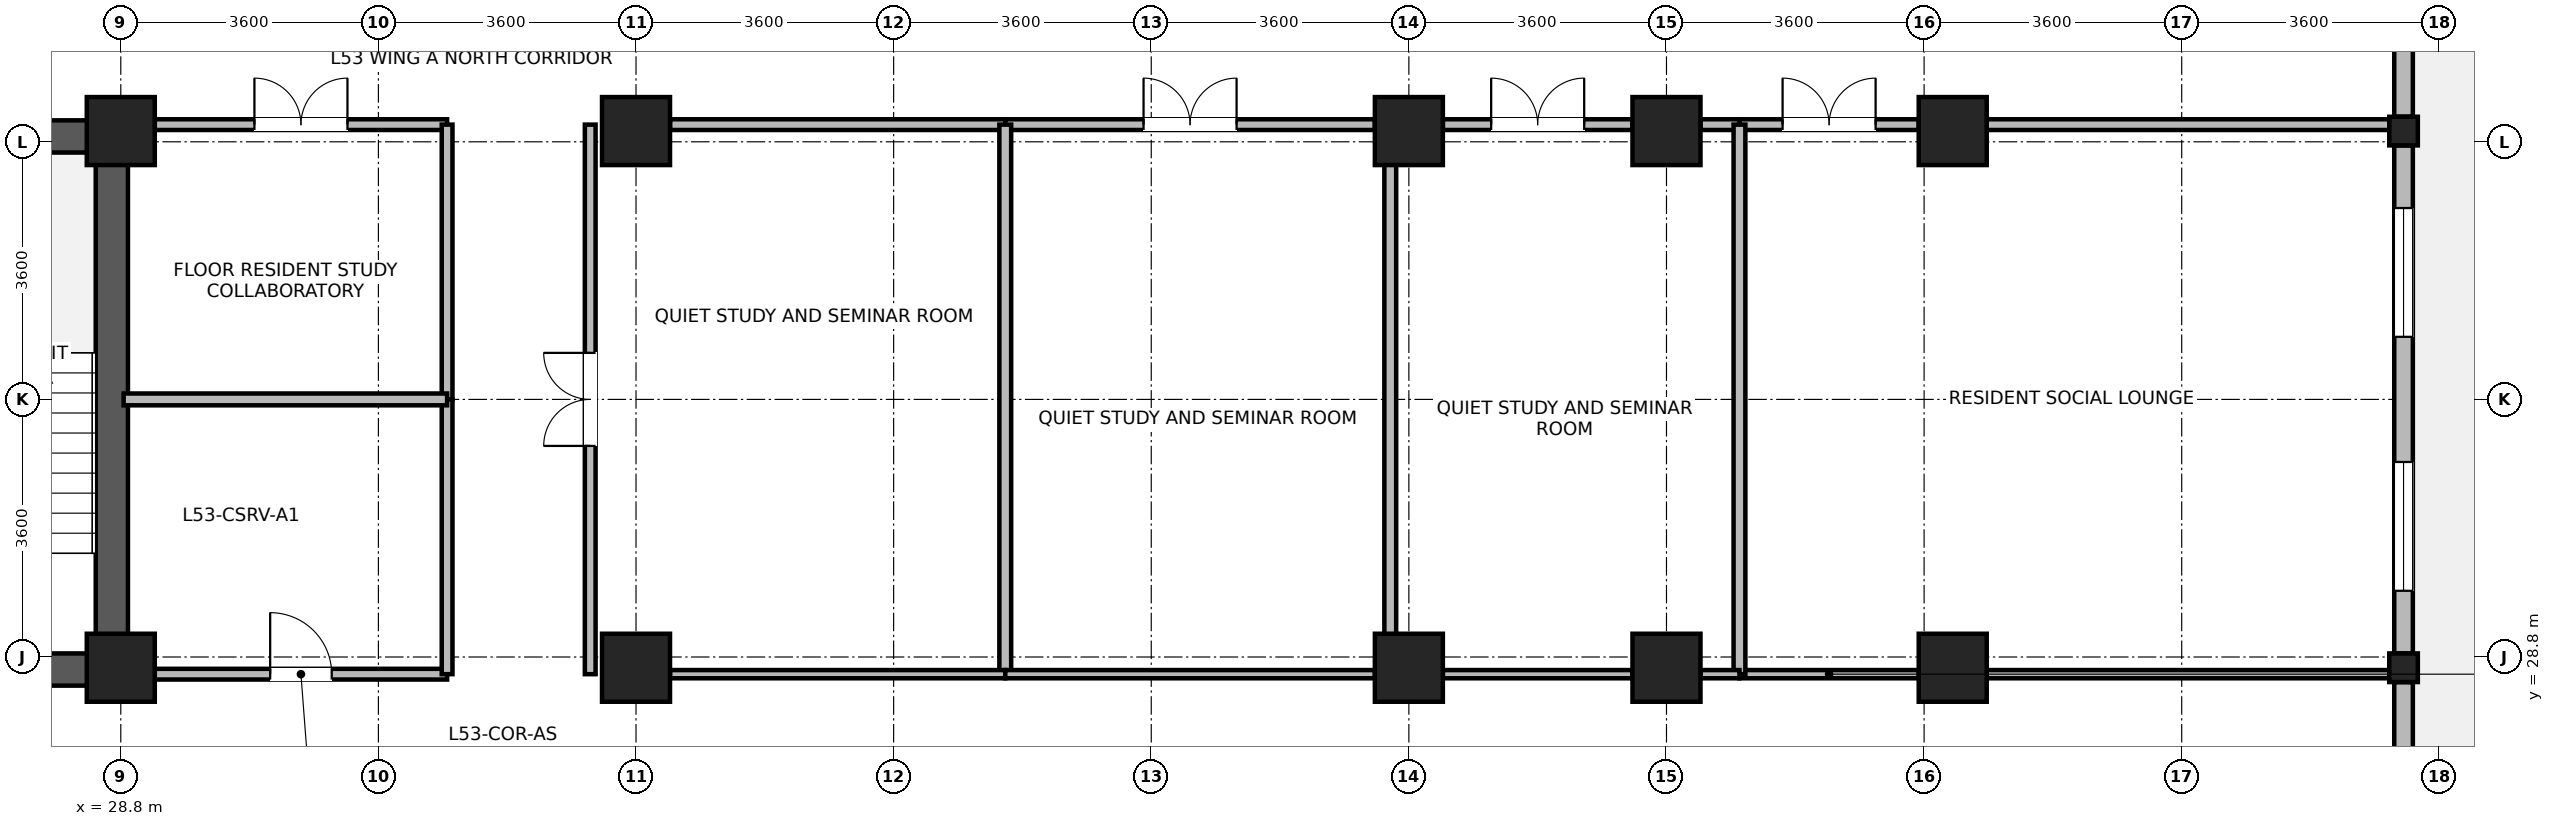
"""IFC4 building model, lengths in metres.
Left out: names, types, materials, properties, quantities, classifications, styles, units other than length and angle.
Written with IfcOpenShell. Run it as: python <this file> out.ifc"""

import sys

from ifc_helpers import new_model, si_unit, direction, frame, frame_2d, origin, origin_2d, place, context, subcontext, project, spatial, rectangle, i_section, extrude, source, transform, mapped, element, fill, save


model = new_model("IFC4")
c1 = context("Model", 3, precision=1e-05, world=origin(), true_north=direction((0.0, 1.0)))
c2 = subcontext(c1, "Body", "Model", "MODEL_VIEW")
j1 = project(units=[si_unit("LENGTHUNIT", "METRE"), si_unit("PLANEANGLEUNIT", "RADIAN")], contexts=[c1])
p1 = place(None, origin())
s1 = spatial("IfcSite", under=j1, at=p1, CompositionType="ELEMENT")
p2 = place(p1, origin())
s2 = spatial("IfcBuilding", under=s1, at=p2, CompositionType="ELEMENT")
p3 = place(p2, frame((0.0, 0.0, 209.2)))
s3 = spatial("IfcBuildingStorey", under=s2, at=p3, CompositionType="ELEMENT", Elevation=209.2)
p4 = place(p3, frame((28.675, 28.4, 0.0), z_axis=(0.0, 0.0, 1.0), x_axis=(0.0, 1.0, 0.0)))
e1 = element("IfcWall", 1, at=p4, inside=s3, PredefinedType="SHEAR", context=c2, shape_type="SweptSolid", body=[
    extrude(rectangle(XDim=7.9, YDim=0.45, at=frame_2d((3.95, 0.0))), origin(), (0.0, 0.0, 1.0), 3.47),
])
for number, where, z_axis, x_axis in (
    (2, (25.25, 28.625, 0.0), (0.0, 0.0, 1.0), (1.0, 0.0, 0.0)),
    (3, (25.25, 36.075, 0.0), (0.0, 0.0, 1.0), (1.0, 0.0, 0.0)),
):
    element("IfcWall", number, at=place(p3, frame(where, z_axis=z_axis, x_axis=x_axis)), inside=s3, PredefinedType="SHEAR", context=c2, shape_type="SweptSolid", body=[
        extrude(rectangle(XDim=3.2, YDim=0.45, at=frame_2d((1.6, 0.0))), origin(), (0.0, 0.0, 1.0), 3.47),
    ])
m1 = source(origin(), c2, "Body", "SweptSolid", [
    extrude(rectangle(XDim=0.95, YDim=0.95, at=origin_2d()), origin(), (0.0, 0.0, 1.0), 3.7),
])
for number, where, z_axis, x_axis in (
    (4, (28.8, 28.65, 0.0), (0.0, 0.0, 1.0), (1.0, 0.0, 0.0)),
    (5, (28.8, 36.15, 0.0), (0.0, 0.0, 1.0), (1.0, 0.0, 0.0)),
    (6, (36.0, 28.65, 0.0), (0.0, 0.0, 1.0), (1.0, 0.0, 0.0)),
    (7, (36.0, 36.15, 0.0), (0.0, 0.0, 1.0), (1.0, 0.0, 0.0)),
    (8, (46.8, 28.65, 0.0), (0.0, 0.0, 1.0), (1.0, 0.0, 0.0)),
    (9, (46.8, 36.15, 0.0), (0.0, 0.0, 1.0), (1.0, 0.0, 0.0)),
    (10, (50.4, 28.65, 0.0), (0.0, 0.0, 1.0), (1.0, 0.0, 0.0)),
    (11, (50.4, 36.15, 0.0), (0.0, 0.0, 1.0), (1.0, 0.0, 0.0)),
    (12, (54.4, 28.65, 0.0), (0.0, 0.0, 1.0), (1.0, 0.0, 0.0)),
    (13, (54.4, 36.15, 0.0), (0.0, 0.0, 1.0), (1.0, 0.0, 0.0)),
):
    element("IfcColumn", number, at=place(p3, frame(where, z_axis=z_axis, x_axis=x_axis)), inside=s3, PredefinedType="COLUMN", context=c2, shape_type="MappedRepresentation", body=[
        mapped(m1, transform((0.0, 0.0, 0.0), x_axis=(1.0, 0.0, 0.0), y_axis=(0.0, 1.0, 0.0), z_axis=(0.0, 0.0, 1.0), scale=1.0)),
    ])
m2 = source(origin(), c2, "Body", "SweptSolid", [
    extrude(i_section(OverallWidth=0.399, OverallDepth=0.4, WebThickness=0.017, FlangeThickness=0.023, FilletRadius=0.015, at=origin_2d()), origin(), (0.0, 0.0, 1.0), 3.7),
])
for number, where, z_axis, x_axis in (
    (14, (60.7, 28.65, 0.0), (0.0, 0.0, 1.0), (1.0, 0.0, 0.0)),
    (15, (60.7, 36.15, 0.0), (0.0, 0.0, 1.0), (1.0, 0.0, 0.0)),
):
    element("IfcColumn", number, at=place(p3, frame(where, z_axis=z_axis, x_axis=x_axis)), inside=s3, PredefinedType="COLUMN", context=c2, shape_type="MappedRepresentation", body=[
        mapped(m2, transform((0.0, 0.0, 0.0), x_axis=(1.0, 0.0, 0.0), y_axis=(0.0, 1.0, 0.0), z_axis=(0.0, 0.0, 1.0), scale=1.0)),
    ])
p5 = place(p3, frame((60.7, 28.449, 0.0), z_axis=(0.0, 0.0, 1.0), x_axis=(0.0, -1.0, 0.0)))
e16 = element("IfcWall", 16, at=p5, inside=s3, PredefinedType="STANDARD", context=c2, shape_type="SweptSolid", body=[
    extrude(rectangle(XDim=6.648, YDim=0.26, at=frame_2d((3.324, 0.0))), origin(), (0.0, 0.0, 1.0), 3.0),
])
p6 = place(p5, frame((4.086, 0.0, 0.85)))
e17 = element("IfcOpeningElement", 17, at=p6, cuts=e16, PredefinedType="OPENING", context=c2, shape_type="SweptSolid", body=[
    extrude(rectangle(XDim=1.8, YDim=1.85, at=frame_2d((0.9, 0.925))), frame((0.0, 0.14, 0.0), z_axis=(0.0, -1.0, 0.0), x_axis=(1.0, 0.0, 0.0)), (0.0, 0.0, 1.0), 0.28),
])
p7 = place(p5, frame((2.317, 0.0, 0.85)))
e18 = element("IfcOpeningElement", 18, at=p7, cuts=e16, PredefinedType="OPENING", context=c2, shape_type="SweptSolid", body=[
    extrude(rectangle(XDim=0.95, YDim=1.75, at=frame_2d((0.475, 0.875))), frame((0.0, 0.14, 0.0), z_axis=(0.0, -1.0, 0.0), x_axis=(1.0, 0.0, 0.0)), (0.0, 0.0, 1.0), 0.28),
])
p8 = place(p3, frame((60.7, 35.949, 0.0), z_axis=(0.0, 0.0, 1.0), x_axis=(0.0, -1.0, 0.0)))
e19 = element("IfcWall", 19, at=p8, inside=s3, PredefinedType="STANDARD", context=c2, shape_type="SweptSolid", body=[
    extrude(rectangle(XDim=7.098, YDim=0.26, at=frame_2d((3.549, 0.0))), origin(), (0.0, 0.0, 1.0), 3.0),
])
p9 = place(p8, frame((0.875, 0.0, 0.85)))
e20 = element("IfcOpeningElement", 20, at=p9, cuts=e19, PredefinedType="OPENING", context=c2, shape_type="SweptSolid", body=[
    extrude(rectangle(XDim=1.8, YDim=1.85, at=frame_2d((0.9, 0.925))), frame((0.0, 0.14, 0.0), z_axis=(0.0, -1.0, 0.0), x_axis=(1.0, 0.0, 0.0)), (0.0, 0.0, 1.0), 0.28),
])
p10 = place(p8, frame((4.424, 0.0, 0.85)))
e21 = element("IfcOpeningElement", 21, at=p10, cuts=e19, PredefinedType="OPENING", context=c2, shape_type="SweptSolid", body=[
    extrude(rectangle(XDim=1.8, YDim=1.85, at=frame_2d((0.9, 0.925))), frame((0.0, 0.14, 0.0), z_axis=(0.0, -1.0, 0.0), x_axis=(1.0, 0.0, 0.0)), (0.0, 0.0, 1.0), 0.28),
])
p11 = place(p3, frame((60.7, 43.33, 0.0), z_axis=(0.0, 0.0, 1.0), x_axis=(0.0, -1.0, 0.0)))
e22 = element("IfcWall", 22, at=p11, inside=s3, PredefinedType="STANDARD", context=c2, shape_type="SweptSolid", body=[
    extrude(rectangle(XDim=6.979, YDim=0.26, at=frame_2d((3.49, 0.0))), origin(), (0.0, 0.0, 1.0), 3.45),
])
p12 = place(p11, frame((0.845, 0.0, 0.85)))
e23 = element("IfcOpeningElement", 23, at=p12, cuts=e22, PredefinedType="OPENING", context=c2, shape_type="SweptSolid", body=[
    extrude(rectangle(XDim=1.8, YDim=1.85, at=frame_2d((0.9, 0.925))), frame((0.0, 0.14, 0.0), z_axis=(0.0, -1.0, 0.0), x_axis=(1.0, 0.0, 0.0)), (0.0, 0.0, 1.0), 0.28),
])
p13 = place(p11, frame((3.014, 0.0, 0.85)))
e24 = element("IfcOpeningElement", 24, at=p13, cuts=e22, PredefinedType="OPENING", context=c2, shape_type="SweptSolid", body=[
    extrude(rectangle(XDim=0.95, YDim=1.75, at=frame_2d((0.475, 0.875))), frame((0.0, 0.14, 0.0), z_axis=(0.0, -1.0, 0.0), x_axis=(1.0, 0.0, 0.0)), (0.0, 0.0, 1.0), 0.28),
])
p14 = place(p3, frame((51.42, 36.24, 0.0), z_axis=(0.0, 0.0, 1.0), x_axis=(1.0, 0.0, 0.0)))
e25 = element("IfcWall", 25, at=p14, inside=s3, PredefinedType="PARTITIONING", context=c2, shape_type="SweptSolid", body=[
    extrude(rectangle(XDim=2.505, YDim=0.15, at=frame_2d((1.252, 0.0))), origin(), (0.0, 0.0, 1.0), 2.85),
])
p15 = place(p14, frame((0.603, 0.0, 0.0)))
e26 = element("IfcOpeningElement", 26, at=p15, cuts=e25, PredefinedType="OPENING", context=c2, shape_type="SweptSolid", body=[
    extrude(rectangle(XDim=1.3, YDim=2.12, at=frame_2d((0.65, 1.06))), frame((0.0, 0.085, 0.0), z_axis=(0.0, -1.0, 0.0), x_axis=(1.0, 0.0, 0.0)), (0.0, 0.0, 1.0), 0.17),
])
p16 = place(p3, frame((54.875, 36.24, 0.0), z_axis=(0.0, 0.0, 1.0), x_axis=(1.0, 0.0, 0.0)))
e27 = element("IfcWall", 27, at=p16, inside=s3, PredefinedType="PARTITIONING", context=c2, shape_type="SweptSolid", body=[
    extrude(rectangle(XDim=5.625, YDim=0.15, at=frame_2d((2.813, 0.0))), origin(), (0.0, 0.0, 1.0), 2.85),
])
p17 = place(p3, frame((35.36, 28.56, 0.0), z_axis=(0.0, 0.0, 1.0), x_axis=(0.0, 1.0, 0.0)))
e28 = element("IfcWall", 28, at=p17, inside=s3, PredefinedType="PARTITIONING", context=c2, shape_type="SweptSolid", body=[
    extrude(rectangle(XDim=7.68, YDim=0.15, at=frame_2d((3.84, 0.0))), origin(), (0.0, 0.0, 1.0), 3.45),
])
p18 = place(p17, frame((3.19, 0.0, 0.0)))
e29 = element("IfcOpeningElement", 29, at=p18, cuts=e28, PredefinedType="OPENING", context=c2, shape_type="SweptSolid", body=[
    extrude(rectangle(XDim=1.3, YDim=2.12, at=frame_2d((0.65, 1.06))), frame((0.0, 0.085, 0.0), z_axis=(0.0, -1.0, 0.0), x_axis=(1.0, 0.0, 0.0)), (0.0, 0.0, 1.0), 0.17),
])
p19 = place(p3, frame((36.475, 36.24, 0.0), z_axis=(0.0, 0.0, 1.0), x_axis=(1.0, 0.0, 0.0)))
e30 = element("IfcWall", 30, at=p19, inside=s3, PredefinedType="PARTITIONING", context=c2, shape_type="SweptSolid", body=[
    extrude(rectangle(XDim=4.685, YDim=0.15, at=frame_2d((2.342, 0.0))), origin(), (0.0, 0.0, 1.0), 2.85),
])
p20 = place(p3, frame((41.16, 36.24, 0.0), z_axis=(0.0, 0.0, 1.0), x_axis=(1.0, 0.0, 0.0)))
e31 = element("IfcWall", 31, at=p20, inside=s3, PredefinedType="PARTITIONING", context=c2, shape_type="SweptSolid", body=[
    extrude(rectangle(XDim=5.165, YDim=0.15, at=frame_2d((2.583, 0.0))), origin(), (0.0, 0.0, 1.0), 2.85),
])
p21 = place(p20, frame((1.933, 0.0, 0.0)))
e32 = element("IfcOpeningElement", 32, at=p21, cuts=e31, PredefinedType="OPENING", context=c2, shape_type="SweptSolid", body=[
    extrude(rectangle(XDim=1.3, YDim=2.12, at=frame_2d((0.65, 1.06))), frame((0.0, 0.085, 0.0), z_axis=(0.0, -1.0, 0.0), x_axis=(1.0, 0.0, 0.0)), (0.0, 0.0, 1.0), 0.17),
])
p22 = place(p3, frame((47.275, 36.24, 0.0), z_axis=(0.0, 0.0, 1.0), x_axis=(1.0, 0.0, 0.0)))
e33 = element("IfcWall", 33, at=p22, inside=s3, PredefinedType="PARTITIONING", context=c2, shape_type="SweptSolid", body=[
    extrude(rectangle(XDim=2.65, YDim=0.15, at=frame_2d((1.325, 0.0))), origin(), (0.0, 0.0, 1.0), 2.85),
])
p23 = place(p22, frame((0.675, 0.0, 0.0)))
e34 = element("IfcOpeningElement", 34, at=p23, cuts=e33, PredefinedType="OPENING", context=c2, shape_type="SweptSolid", body=[
    extrude(rectangle(XDim=1.3, YDim=2.12, at=frame_2d((0.65, 1.06))), frame((0.0, 0.085, 0.0), z_axis=(0.0, -1.0, 0.0), x_axis=(1.0, 0.0, 0.0)), (0.0, 0.0, 1.0), 0.17),
])
p24 = place(p3, frame((50.875, 36.24, 0.0), z_axis=(0.0, 0.0, 1.0), x_axis=(1.0, 0.0, 0.0)))
e35 = element("IfcWall", 35, at=p24, inside=s3, PredefinedType="PARTITIONING", context=c2, shape_type="SweptSolid", body=[
    extrude(rectangle(XDim=0.545, YDim=0.15, at=frame_2d((0.272, 0.0))), origin(), (0.0, 0.0, 1.0), 2.85),
])
p25 = place(p3, frame((29.275, 28.56, 0.0), z_axis=(0.0, 0.0, 1.0), x_axis=(1.0, 0.0, 0.0)))
e36 = element("IfcWall", 36, at=p25, inside=s3, PredefinedType="PARTITIONING", context=c2, shape_type="SweptSolid", body=[
    extrude(rectangle(XDim=4.085, YDim=0.15, at=frame_2d((2.042, 0.0))), origin(), (0.0, 0.0, 1.0), 2.85),
])
p26 = place(p25, frame((1.613, 0.0, 0.0)))
e37 = element("IfcOpeningElement", 37, at=p26, cuts=e36, PredefinedType="OPENING", context=c2, shape_type="SweptSolid", body=[
    extrude(rectangle(XDim=0.86, YDim=2.02, at=frame_2d((0.43, 1.01))), frame((0.0, 0.085, 0.0), z_axis=(0.0, -1.0, 0.0), x_axis=(1.0, 0.0, 0.0)), (0.0, 0.0, 1.0), 0.17),
])
p27 = place(p3, frame((29.275, 36.24, 0.0), z_axis=(0.0, 0.0, 1.0), x_axis=(1.0, 0.0, 0.0)))
e38 = element("IfcWall", 38, at=p27, inside=s3, PredefinedType="PARTITIONING", context=c2, shape_type="SweptSolid", body=[
    extrude(rectangle(XDim=4.085, YDim=0.15, at=frame_2d((2.042, 0.0))), origin(), (0.0, 0.0, 1.0), 2.85),
])
p28 = place(p27, frame((1.393, 0.0, 0.0)))
e39 = element("IfcOpeningElement", 39, at=p28, cuts=e38, PredefinedType="OPENING", context=c2, shape_type="SweptSolid", body=[
    extrude(rectangle(XDim=1.3, YDim=2.12, at=frame_2d((0.65, 1.06))), frame((0.0, 0.085, 0.0), z_axis=(0.0, -1.0, 0.0), x_axis=(1.0, 0.0, 0.0)), (0.0, 0.0, 1.0), 0.17),
])
p29 = place(p3, frame((33.36, 32.4, 0.0), z_axis=(0.0, 0.0, 1.0), x_axis=(0.0, 1.0, 0.0)))
e40 = element("IfcWall", 40, at=p29, inside=s3, PredefinedType="PARTITIONING", context=c2, shape_type="SweptSolid", body=[
    extrude(rectangle(XDim=3.84, YDim=0.15, at=frame_2d((1.92, 0.0))), origin(), (0.0, 0.0, 1.0), 3.45),
])
p30 = place(p3, frame((33.36, 28.56, 0.0), z_axis=(0.0, 0.0, 1.0), x_axis=(0.0, 1.0, 0.0)))
e41 = element("IfcWall", 41, at=p30, inside=s3, PredefinedType="PARTITIONING", context=c2, shape_type="SweptSolid", body=[
    extrude(rectangle(XDim=3.84, YDim=0.15, at=frame_2d((1.92, 0.0))), origin(), (0.0, 0.0, 1.0), 3.45),
])
p31 = place(p3, frame((51.42, 28.56, 0.0), z_axis=(0.0, 0.0, 1.0), x_axis=(1.0, 0.0, 0.0)))
e42 = element("IfcWall", 42, at=p31, inside=s3, PredefinedType="PARTITIONING", context=c2, shape_type="SweptSolid", body=[
    extrude(rectangle(XDim=2.505, YDim=0.115, at=frame_2d((1.252, 0.0))), origin(), (0.0, 0.0, 1.0), 2.85),
])
p32 = place(p3, frame((54.875, 28.56, 0.0), z_axis=(0.0, 0.0, 1.0), x_axis=(1.0, 0.0, 0.0)))
e43 = element("IfcWall", 43, at=p32, inside=s3, PredefinedType="PARTITIONING", context=c2, shape_type="SweptSolid", body=[
    extrude(rectangle(XDim=5.625, YDim=0.115, at=frame_2d((2.813, 0.0))), origin(), (0.0, 0.0, 1.0), 2.85),
])
for number, where, z_axis, x_axis in (
    (44, (41.16, 28.56, 0.0), (0.0, 0.0, 1.0), (0.0, 1.0, 0.0)),
    (45, (46.54, 28.56, 0.0), (0.0, 0.0, 1.0), (0.0, 1.0, 0.0)),
    (46, (51.42, 28.56, 0.0), (0.0, 0.0, 1.0), (0.0, 1.0, 0.0)),
):
    element("IfcWall", number, at=place(p3, frame(where, z_axis=z_axis, x_axis=x_axis)), inside=s3, PredefinedType="PARTITIONING", context=c2, shape_type="SweptSolid", body=[
        extrude(rectangle(XDim=7.68, YDim=0.165, at=frame_2d((3.84, 0.0))), origin(), (0.0, 0.0, 1.0), 3.45),
    ])
p33 = place(p3, frame((36.475, 28.56, 0.0), z_axis=(0.0, 0.0, 1.0), x_axis=(1.0, 0.0, 0.0)))
e47 = element("IfcWall", 47, at=p33, inside=s3, PredefinedType="PARTITIONING", context=c2, shape_type="SweptSolid", body=[
    extrude(rectangle(XDim=4.685, YDim=0.115, at=frame_2d((2.342, 0.0))), origin(), (0.0, 0.0, 1.0), 2.85),
])
p34 = place(p3, frame((41.16, 28.56, 0.0), z_axis=(0.0, 0.0, 1.0), x_axis=(1.0, 0.0, 0.0)))
e48 = element("IfcWall", 48, at=p34, inside=s3, PredefinedType="PARTITIONING", context=c2, shape_type="SweptSolid", body=[
    extrude(rectangle(XDim=5.165, YDim=0.115, at=frame_2d((2.583, 0.0))), origin(), (0.0, 0.0, 1.0), 2.85),
])
p35 = place(p3, frame((47.275, 28.56, 0.0), z_axis=(0.0, 0.0, 1.0), x_axis=(1.0, 0.0, 0.0)))
e49 = element("IfcWall", 49, at=p35, inside=s3, PredefinedType="PARTITIONING", context=c2, shape_type="SweptSolid", body=[
    extrude(rectangle(XDim=2.65, YDim=0.115, at=frame_2d((1.325, 0.0))), origin(), (0.0, 0.0, 1.0), 2.85),
])
p36 = place(p3, frame((50.875, 28.56, 0.0), z_axis=(0.0, 0.0, 1.0), x_axis=(1.0, 0.0, 0.0)))
e50 = element("IfcWall", 50, at=p36, inside=s3, PredefinedType="PARTITIONING", context=c2, shape_type="SweptSolid", body=[
    extrude(rectangle(XDim=0.545, YDim=0.115, at=frame_2d((0.272, 0.0))), origin(), (0.0, 0.0, 1.0), 2.85),
])
p37 = place(p3, frame((28.84, 32.4, 0.0), z_axis=(0.0, 0.0, 1.0), x_axis=(1.0, 0.0, 0.0)))
e51 = element("IfcWall", 51, at=p37, inside=s3, PredefinedType="PARTITIONING", context=c2, shape_type="SweptSolid", body=[
    extrude(rectangle(XDim=4.52, YDim=0.165, at=frame_2d((2.26, 0.0))), origin(), (0.0, 0.0, 1.0), 3.45),
])
p38 = place(p9, origin())
e52 = element("IfcWindow", 52, at=p38, inside=s3, PartitioningType="SINGLE_PANEL", PredefinedType="WINDOW", context=c2, shape_type="SweptSolid", body=[
    extrude(rectangle(XDim=1.8, YDim=1.85, at=frame_2d((0.9, 0.925))), frame((0.0, 0.03, 0.0), z_axis=(0.0, -1.0, 0.0), x_axis=(1.0, 0.0, 0.0)), (0.0, 0.0, 1.0), 0.06),
])
fill(e20, e52)
p39 = place(p10, origin())
e53 = element("IfcWindow", 53, at=p39, inside=s3, PartitioningType="SINGLE_PANEL", PredefinedType="WINDOW", context=c2, shape_type="SweptSolid", body=[
    extrude(rectangle(XDim=1.8, YDim=1.85, at=frame_2d((0.9, 0.925))), frame((0.0, 0.03, 0.0), z_axis=(0.0, -1.0, 0.0), x_axis=(1.0, 0.0, 0.0)), (0.0, 0.0, 1.0), 0.06),
])
fill(e21, e53)
p40 = place(p15, origin())
e54 = element("IfcDoor", 54, at=p40, inside=s3, OperationType="DOUBLE_DOOR_SINGLE_SWING", PredefinedType="DOOR", context=c2, shape_type="SweptSolid", body=[
    extrude(rectangle(XDim=1.3, YDim=2.12, at=frame_2d((0.65, 1.06))), frame((0.0, 0.025, 0.0), z_axis=(0.0, -1.0, 0.0), x_axis=(1.0, 0.0, 0.0)), (0.0, 0.0, 1.0), 0.05),
])
fill(e26, e54)
p41 = place(p18, origin())
e55 = element("IfcDoor", 55, at=p41, inside=s3, OperationType="DOUBLE_DOOR_SINGLE_SWING", PredefinedType="DOOR", context=c2, shape_type="SweptSolid", body=[
    extrude(rectangle(XDim=1.3, YDim=2.12, at=frame_2d((0.65, 1.06))), frame((0.0, 0.025, 0.0), z_axis=(0.0, -1.0, 0.0), x_axis=(1.0, 0.0, 0.0)), (0.0, 0.0, 1.0), 0.05),
])
fill(e29, e55)
p42 = place(p21, origin())
e56 = element("IfcDoor", 56, at=p42, inside=s3, OperationType="DOUBLE_DOOR_SINGLE_SWING", PredefinedType="DOOR", context=c2, shape_type="SweptSolid", body=[
    extrude(rectangle(XDim=1.3, YDim=2.12, at=frame_2d((0.65, 1.06))), frame((0.0, 0.025, 0.0), z_axis=(0.0, -1.0, 0.0), x_axis=(1.0, 0.0, 0.0)), (0.0, 0.0, 1.0), 0.05),
])
fill(e32, e56)
p43 = place(p23, origin())
e57 = element("IfcDoor", 57, at=p43, inside=s3, OperationType="DOUBLE_DOOR_SINGLE_SWING", PredefinedType="DOOR", context=c2, shape_type="SweptSolid", body=[
    extrude(rectangle(XDim=1.3, YDim=2.12, at=frame_2d((0.65, 1.06))), frame((0.0, 0.025, 0.0), z_axis=(0.0, -1.0, 0.0), x_axis=(1.0, 0.0, 0.0)), (0.0, 0.0, 1.0), 0.05),
])
fill(e34, e57)
p44 = place(p26, origin())
e58 = element("IfcDoor", 58, at=p44, inside=s3, OperationType="SINGLE_SWING_LEFT", PredefinedType="DOOR", context=c2, shape_type="SweptSolid", body=[
    extrude(rectangle(XDim=0.86, YDim=2.02, at=frame_2d((0.43, 1.01))), frame((0.0, 0.025, 0.0), z_axis=(0.0, -1.0, 0.0), x_axis=(1.0, 0.0, 0.0)), (0.0, 0.0, 1.0), 0.05),
])
fill(e37, e58)
p45 = place(p28, origin())
e59 = element("IfcDoor", 59, at=p45, inside=s3, OperationType="DOUBLE_DOOR_SINGLE_SWING", PredefinedType="DOOR", context=c2, shape_type="SweptSolid", body=[
    extrude(rectangle(XDim=1.3, YDim=2.12, at=frame_2d((0.65, 1.06))), frame((0.0, 0.025, 0.0), z_axis=(0.0, -1.0, 0.0), x_axis=(1.0, 0.0, 0.0)), (0.0, 0.0, 1.0), 0.05),
])
fill(e39, e59)
save(model, sys.argv[1])
